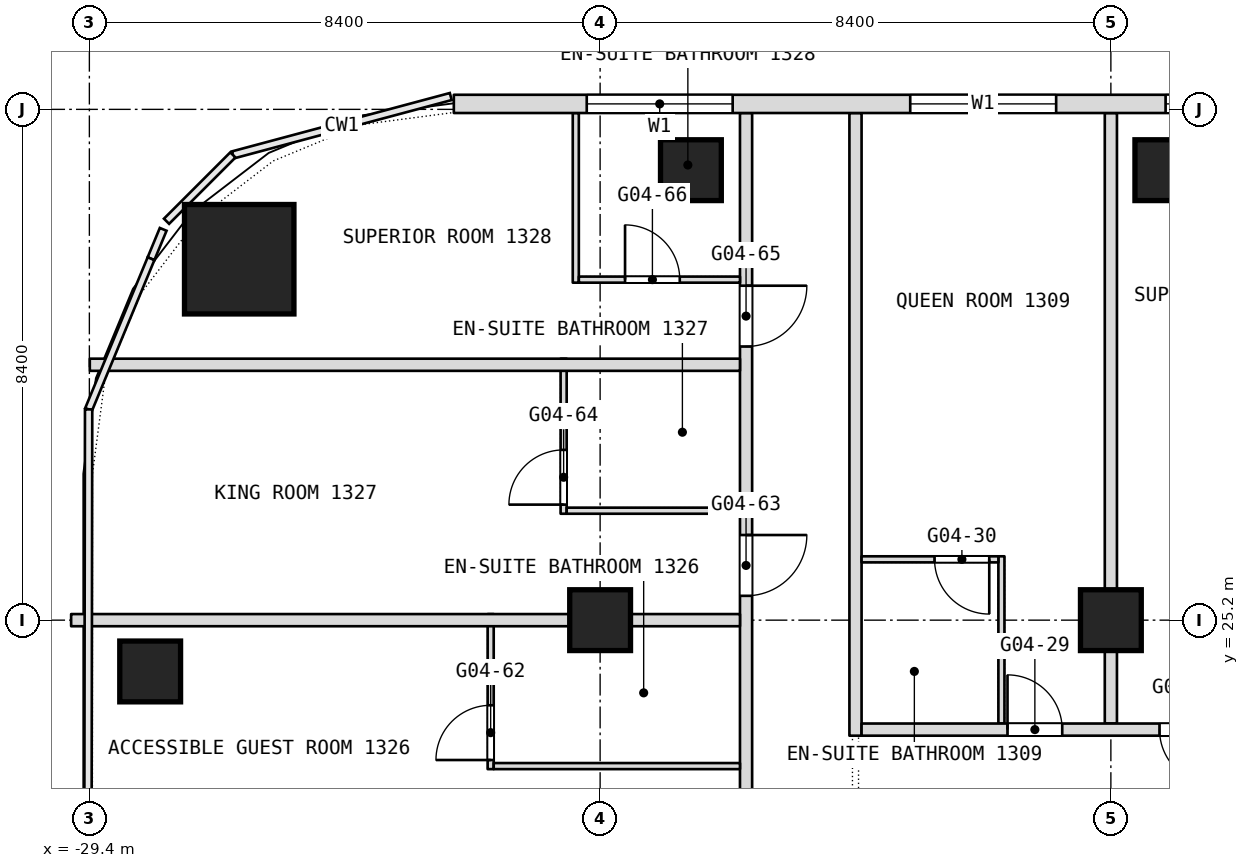
"""IFC4 building model, lengths in metres.
Left out: names, types, materials, properties, quantities, classifications, styles, units other than length and angle.
Written with IfcOpenShell. Run it as: python <this file> out.ifc"""

import sys

from ifc_helpers import new_model, si_unit, direction, frame, frame_2d, origin, origin_2d, place, context, subcontext, project, spatial, rectangle, extrude, element, fill, save


model = new_model("IFC4")
c1 = context("Model", 3, precision=1e-05, world=origin(), true_north=direction((0.0, 1.0)))
c2 = subcontext(c1, "Body", "Model", "MODEL_VIEW")
j1 = project(units=[si_unit("LENGTHUNIT", "METRE"), si_unit("PLANEANGLEUNIT", "RADIAN")], contexts=[c1])
p1 = place(None, origin())
s1 = spatial("IfcSite", under=j1, at=p1, CompositionType="ELEMENT")
p2 = place(p1, origin())
s2 = spatial("IfcBuilding", under=s1, at=p2, CompositionType="ELEMENT")
p3 = place(p2, frame((0.0, 0.0, 61.7)))
s3 = spatial("IfcBuildingStorey", under=s2, at=p3, CompositionType="ELEMENT", Elevation=61.7)
p4 = place(p3, frame((-26.936, 31.135, 0.0), z_axis=(0.0, 0.0, 1.0), x_axis=(1.0, 0.0, 0.0)))
e1 = element("IfcColumn", 1, at=p4, inside=s3, PredefinedType="COLUMN", context=c2, shape_type="SweptSolid", body=[
    extrude(rectangle(XDim=1.8, YDim=1.8, at=origin_2d()), origin(), (0.0, 0.0, 1.0), 3.6),
])
for number, where, z_axis, x_axis in (
    (2, (-21.0, 25.2, 0.0), (0.0, 0.0, 1.0), (1.0, 0.0, 0.0)),
    (3, (-12.6, 25.2, 0.0), (0.0, 0.0, 1.0), (1.0, 0.0, 0.0)),
    (4, (-28.4, 24.356, 0.0), (0.0, 0.0, 1.0), (1.0, 0.0, 0.0)),
    (5, (-19.507, 32.6, 0.0), (0.0, 0.0, 1.0), (1.0, 0.0, 0.0)),
    (6, (-11.704, 32.6, 0.0), (0.0, 0.0, 1.0), (1.0, 0.0, 0.0)),
):
    element("IfcColumn", number, at=place(p3, frame(where, z_axis=z_axis, x_axis=x_axis)), inside=s3, PredefinedType="COLUMN", context=c2, shape_type="SweptSolid", body=[
        extrude(rectangle(XDim=1.0, YDim=1.0, at=origin_2d()), origin(), (0.0, 0.0, 1.0), 3.6),
    ])
p5 = place(p3, frame((-12.6, 23.5, 0.0), z_axis=(0.0, 0.0, 1.0), x_axis=(0.0, 1.0, 0.0)))
e7 = element("IfcWall", 7, at=p5, inside=s3, PredefinedType="PARTITIONING", context=c2, shape_type="SweptSolid", body=[
    extrude(rectangle(XDim=10.04, YDim=0.2, at=frame_2d((5.02, 0.0))), origin(), (0.0, 0.0, 1.0), 3.34),
])
p6 = place(p3, frame((-14.4, 23.5, 0.0), z_axis=(0.0, 0.0, 1.0), x_axis=(0.0, 1.0, 0.0)))
e8 = element("IfcWall", 8, at=p6, inside=s3, PredefinedType="PARTITIONING", context=c2, shape_type="SweptSolid", body=[
    extrude(rectangle(XDim=2.75, YDim=0.1, at=frame_2d((1.375, 0.0))), origin(), (0.0, 0.0, 1.0), 3.34),
])
p7 = place(p3, frame((-16.8, 23.3, 0.0), z_axis=(0.0, 0.0, 1.0), x_axis=(0.0, 1.0, 0.0)))
e9 = element("IfcWall", 9, at=p7, inside=s3, PredefinedType="PARTITIONING", context=c2, shape_type="SweptSolid", body=[
    extrude(rectangle(XDim=10.24, YDim=0.2, at=frame_2d((5.12, 0.0))), origin(), (0.0, 0.0, 1.0), 3.34),
])
p8 = place(p3, frame((-18.6, 18.5, 0.0), z_axis=(0.0, 0.0, 1.0), x_axis=(0.0, 1.0, 0.0)))
e10 = element("IfcWall", 10, at=p8, inside=s3, PredefinedType="PARTITIONING", context=c2, shape_type="SweptSolid", body=[
    extrude(rectangle(XDim=15.04, YDim=0.2, at=frame_2d((7.52, 0.0))), origin(), (0.0, 0.0, 1.0), 3.34),
])
p9 = place(p8, frame((2.9, 0.0, 0.0)))
e11 = element("IfcOpeningElement", 11, at=p9, cuts=e10, PredefinedType="OPENING", context=c2, shape_type="SweptSolid", body=[
    extrude(rectangle(XDim=1.0, YDim=2.1, at=frame_2d((0.5, 1.05))), frame((0.0, 0.1, 0.0), z_axis=(0.0, -1.0, 0.0), x_axis=(1.0, 0.0, 0.0)), (0.0, 0.0, 1.0), 0.2),
])
p10 = place(p8, frame((7.1, 0.0, 0.0)))
e12 = element("IfcOpeningElement", 12, at=p10, cuts=e10, PredefinedType="OPENING", context=c2, shape_type="SweptSolid", body=[
    extrude(rectangle(XDim=1.0, YDim=2.1, at=frame_2d((0.5, 1.05))), frame((0.0, 0.1, 0.0), z_axis=(0.0, -1.0, 0.0), x_axis=(1.0, 0.0, 0.0)), (0.0, 0.0, 1.0), 0.2),
])
p11 = place(p8, frame((11.2, 0.0, 0.0)))
e13 = element("IfcOpeningElement", 13, at=p11, cuts=e10, PredefinedType="OPENING", context=c2, shape_type="SweptSolid", body=[
    extrude(rectangle(XDim=1.0, YDim=2.1, at=frame_2d((0.5, 1.05))), frame((0.0, 0.1, 0.0), z_axis=(0.0, -1.0, 0.0), x_axis=(1.0, 0.0, 0.0)), (0.0, 0.0, 1.0), 0.2),
])
p12 = place(p3, frame((-21.4, 30.75, 0.0), z_axis=(0.0, 0.0, 1.0), x_axis=(0.0, 1.0, 0.0)))
e14 = element("IfcWall", 14, at=p12, inside=s3, PredefinedType="PARTITIONING", context=c2, shape_type="SweptSolid", body=[
    extrude(rectangle(XDim=2.79, YDim=0.1, at=frame_2d((1.395, 0.0))), origin(), (0.0, 0.0, 1.0), 3.34),
])
p13 = place(p3, frame((-21.6, 26.95, 0.0), z_axis=(0.0, 0.0, 1.0), x_axis=(0.0, 1.0, 0.0)))
e15 = element("IfcWall", 15, at=p13, inside=s3, PredefinedType="PARTITIONING", context=c2, shape_type="SweptSolid", body=[
    extrude(rectangle(XDim=2.55, YDim=0.1, at=frame_2d((1.275, 0.0))), origin(), (0.0, 0.0, 1.0), 3.34),
])
p14 = place(p13, frame((0.15, 0.0, 0.0)))
e16 = element("IfcOpeningElement", 16, at=p14, cuts=e15, PredefinedType="OPENING", context=c2, shape_type="SweptSolid", body=[
    extrude(rectangle(XDim=0.9, YDim=2.1, at=frame_2d((0.45, 1.05))), frame((0.0, 0.05, 0.0), z_axis=(0.0, -1.0, 0.0), x_axis=(1.0, 0.0, 0.0)), (0.0, 0.0, 1.0), 0.1),
])
p15 = place(p3, frame((-22.8, 22.75, 0.0), z_axis=(0.0, 0.0, 1.0), x_axis=(0.0, 1.0, 0.0)))
e17 = element("IfcWall", 17, at=p15, inside=s3, PredefinedType="PARTITIONING", context=c2, shape_type="SweptSolid", body=[
    extrude(rectangle(XDim=2.55, YDim=0.1, at=frame_2d((1.275, 0.0))), origin(), (0.0, 0.0, 1.0), 3.34),
])
p16 = place(p15, frame((0.15, 0.0, 0.0)))
e18 = element("IfcOpeningElement", 18, at=p16, cuts=e17, PredefinedType="OPENING", context=c2, shape_type="SweptSolid", body=[
    extrude(rectangle(XDim=0.9, YDim=2.1, at=frame_2d((0.45, 1.05))), frame((0.0, 0.05, 0.0), z_axis=(0.0, -1.0, 0.0), x_axis=(1.0, 0.0, 0.0)), (0.0, 0.0, 1.0), 0.1),
])
p17 = place(p3, frame((-22.75, 22.8, 0.0), z_axis=(0.0, 0.0, 1.0), x_axis=(1.0, 0.0, 0.0)))
e19 = element("IfcWall", 19, at=p17, inside=s3, PredefinedType="PARTITIONING", context=c2, shape_type="SweptSolid", body=[
    extrude(rectangle(XDim=4.05, YDim=0.1, at=frame_2d((2.025, 0.0))), origin(), (0.0, 0.0, 1.0), 3.34),
])
p18 = place(p3, frame((-16.7, 23.4, 0.0), z_axis=(0.0, 0.0, 1.0), x_axis=(1.0, 0.0, 0.0)))
e20 = element("IfcWall", 20, at=p18, inside=s3, PredefinedType="PARTITIONING", context=c2, shape_type="SweptSolid", body=[
    extrude(rectangle(XDim=23.4, YDim=0.2, at=frame_2d((11.7, 0.0))), origin(), (0.0, 0.0, 1.0), 3.34),
])
p19 = place(p18, frame((2.4, 0.0, 0.0)))
e21 = element("IfcOpeningElement", 21, at=p19, cuts=e20, PredefinedType="OPENING", context=c2, shape_type="SweptSolid", body=[
    extrude(rectangle(XDim=0.9, YDim=2.1, at=frame_2d((0.45, 1.05))), frame((0.0, 0.1, 0.0), z_axis=(0.0, -1.0, 0.0), x_axis=(1.0, 0.0, 0.0)), (0.0, 0.0, 1.0), 0.2),
])
p20 = place(p18, frame((4.9, 0.0, 0.0)))
e22 = element("IfcOpeningElement", 22, at=p20, cuts=e20, PredefinedType="OPENING", context=c2, shape_type="SweptSolid", body=[
    extrude(rectangle(XDim=0.9, YDim=2.1, at=frame_2d((0.45, 1.05))), frame((0.0, 0.1, 0.0), z_axis=(0.0, -1.0, 0.0), x_axis=(1.0, 0.0, 0.0)), (0.0, 0.0, 1.0), 0.2),
])
p21 = place(p18, frame((10.8, 0.0, 0.0)))
e23 = element("IfcOpeningElement", 23, at=p21, cuts=e20, PredefinedType="OPENING", context=c2, shape_type="SweptSolid", body=[
    extrude(rectangle(XDim=0.9, YDim=2.1, at=frame_2d((0.45, 1.05))), frame((0.0, 0.1, 0.0), z_axis=(0.0, -1.0, 0.0), x_axis=(1.0, 0.0, 0.0)), (0.0, 0.0, 1.0), 0.2),
])
p22 = place(p18, frame((16.2, 0.0, 0.0)))
e24 = element("IfcOpeningElement", 24, at=p22, cuts=e20, PredefinedType="OPENING", context=c2, shape_type="SweptSolid", body=[
    extrude(rectangle(XDim=1.1, YDim=2.1, at=frame_2d((0.55, 1.05))), frame((0.0, 0.1, 0.0), z_axis=(0.0, -1.0, 0.0), x_axis=(1.0, 0.0, 0.0)), (0.0, 0.0, 1.0), 0.2),
])
p23 = place(p18, frame((21.7, 0.0, 0.0)))
e25 = element("IfcOpeningElement", 25, at=p23, cuts=e20, PredefinedType="OPENING", context=c2, shape_type="SweptSolid", body=[
    extrude(rectangle(XDim=0.9, YDim=2.1, at=frame_2d((0.45, 1.05))), frame((0.0, 0.1, 0.0), z_axis=(0.0, -1.0, 0.0), x_axis=(1.0, 0.0, 0.0)), (0.0, 0.0, 1.0), 0.2),
])
p24 = place(p3, frame((-29.7, 25.2, 0.0), z_axis=(0.0, 0.0, 1.0), x_axis=(1.0, 0.0, 0.0)))
e26 = element("IfcWall", 26, at=p24, inside=s3, PredefinedType="PARTITIONING", context=c2, shape_type="SweptSolid", body=[
    extrude(rectangle(XDim=11.0, YDim=0.2, at=frame_2d((5.5, 0.0))), origin(), (0.0, 0.0, 1.0), 2.84),
])
p25 = place(p3, frame((-16.7, 26.2, 0.0), z_axis=(0.0, 0.0, 1.0), x_axis=(1.0, 0.0, 0.0)))
e27 = element("IfcWall", 27, at=p25, inside=s3, PredefinedType="PARTITIONING", context=c2, shape_type="SweptSolid", body=[
    extrude(rectangle(XDim=2.25, YDim=0.1, at=frame_2d((1.125, 0.0))), origin(), (0.0, 0.0, 1.0), 3.34),
])
p26 = place(p25, frame((1.2, 0.0, 0.0)))
e28 = element("IfcOpeningElement", 28, at=p26, cuts=e27, PredefinedType="OPENING", context=c2, shape_type="SweptSolid", body=[
    extrude(rectangle(XDim=0.9, YDim=2.1, at=frame_2d((0.45, 1.05))), frame((0.0, 0.05, 0.0), z_axis=(0.0, -1.0, 0.0), x_axis=(1.0, 0.0, 0.0)), (0.0, 0.0, 1.0), 0.1),
])
p27 = place(p3, frame((-21.55, 27.0, 0.0), z_axis=(0.0, 0.0, 1.0), x_axis=(1.0, 0.0, 0.0)))
e29 = element("IfcWall", 29, at=p27, inside=s3, PredefinedType="PARTITIONING", context=c2, shape_type="SweptSolid", body=[
    extrude(rectangle(XDim=2.85, YDim=0.1, at=frame_2d((1.425, 0.0))), origin(), (0.0, 0.0, 1.0), 3.34),
])
p28 = place(p3, frame((-29.393, 29.4, 0.0), z_axis=(0.0, 0.0, 1.0), x_axis=(1.0, 0.0, 0.0)))
e30 = element("IfcWall", 30, at=p28, inside=s3, PredefinedType="PARTITIONING", context=c2, shape_type="SweptSolid", body=[
    extrude(rectangle(XDim=10.693, YDim=0.2, at=frame_2d((5.347, 0.0))), origin(), (0.0, 0.0, 1.0), 3.34),
])
p29 = place(p3, frame((-21.35, 30.8, 0.0), z_axis=(0.0, 0.0, 1.0), x_axis=(1.0, 0.0, 0.0)))
e31 = element("IfcWall", 31, at=p29, inside=s3, PredefinedType="PARTITIONING", context=c2, shape_type="SweptSolid", body=[
    extrude(rectangle(XDim=2.65, YDim=0.1, at=frame_2d((1.325, 0.0))), origin(), (0.0, 0.0, 1.0), 3.34),
])
p30 = place(p29, frame((0.76, 0.0, 0.0)))
e32 = element("IfcOpeningElement", 32, at=p30, cuts=e31, PredefinedType="OPENING", context=c2, shape_type="SweptSolid", body=[
    extrude(rectangle(XDim=0.9, YDim=2.1, at=frame_2d((0.45, 1.05))), frame((0.0, 0.05, 0.0), z_axis=(0.0, -1.0, 0.0), x_axis=(1.0, 0.0, 0.0)), (0.0, 0.0, 1.0), 0.1),
])
p31 = place(p3, frame((23.406, 33.69, 0.0), z_axis=(0.0, 0.0, 1.0), x_axis=(-1.0, 0.0, 0.0)))
e33 = element("IfcWall", 33, at=p31, inside=s3, PredefinedType="NOTDEFINED", context=c2, shape_type="SweptSolid", body=[
    extrude(rectangle(XDim=46.812, YDim=0.3, at=frame_2d((23.406, 0.0))), origin(), (0.0, 0.0, 1.0), 3.6),
])
p32 = place(p31, frame((2.186, 0.0, 0.9)))
e34 = element("IfcOpeningElement", 34, at=p32, cuts=e33, PredefinedType="OPENING", context=c2, shape_type="SweptSolid", body=[
    extrude(rectangle(XDim=2.4, YDim=2.1, at=frame_2d((1.2, 1.05))), frame((0.0, 0.15, 0.0), z_axis=(0.0, -1.0, 0.0), x_axis=(1.0, 0.0, 0.0)), (0.0, 0.0, 1.0), 0.3),
])
p33 = place(p31, frame((7.506, 0.0, 0.9)))
e35 = element("IfcOpeningElement", 35, at=p33, cuts=e33, PredefinedType="OPENING", context=c2, shape_type="SweptSolid", body=[
    extrude(rectangle(XDim=2.4, YDim=2.1, at=frame_2d((1.2, 1.05))), frame((0.0, 0.15, 0.0), z_axis=(0.0, -1.0, 0.0), x_axis=(1.0, 0.0, 0.0)), (0.0, 0.0, 1.0), 0.3),
])
p34 = place(p31, frame((11.706, 0.0, 0.9)))
e36 = element("IfcOpeningElement", 36, at=p34, cuts=e33, PredefinedType="OPENING", context=c2, shape_type="SweptSolid", body=[
    extrude(rectangle(XDim=2.4, YDim=2.1, at=frame_2d((1.2, 1.05))), frame((0.0, 0.15, 0.0), z_axis=(0.0, -1.0, 0.0), x_axis=(1.0, 0.0, 0.0)), (0.0, 0.0, 1.0), 0.3),
])
p35 = place(p31, frame((15.906, 0.0, 0.9)))
e37 = element("IfcOpeningElement", 37, at=p35, cuts=e33, PredefinedType="OPENING", context=c2, shape_type="SweptSolid", body=[
    extrude(rectangle(XDim=2.4, YDim=2.1, at=frame_2d((1.2, 1.05))), frame((0.0, 0.15, 0.0), z_axis=(0.0, -1.0, 0.0), x_axis=(1.0, 0.0, 0.0)), (0.0, 0.0, 1.0), 0.3),
])
p36 = place(p31, frame((20.106, 0.0, 0.9)))
e38 = element("IfcOpeningElement", 38, at=p36, cuts=e33, PredefinedType="OPENING", context=c2, shape_type="SweptSolid", body=[
    extrude(rectangle(XDim=2.4, YDim=2.1, at=frame_2d((1.2, 1.05))), frame((0.0, 0.15, 0.0), z_axis=(0.0, -1.0, 0.0), x_axis=(1.0, 0.0, 0.0)), (0.0, 0.0, 1.0), 0.3),
])
p37 = place(p31, frame((24.306, 0.0, 0.9)))
e39 = element("IfcOpeningElement", 39, at=p37, cuts=e33, PredefinedType="OPENING", context=c2, shape_type="SweptSolid", body=[
    extrude(rectangle(XDim=2.4, YDim=2.1, at=frame_2d((1.2, 1.05))), frame((0.0, 0.15, 0.0), z_axis=(0.0, -1.0, 0.0), x_axis=(1.0, 0.0, 0.0)), (0.0, 0.0, 1.0), 0.3),
])
p38 = place(p31, frame((28.506, 0.0, 0.9)))
e40 = element("IfcOpeningElement", 40, at=p38, cuts=e33, PredefinedType="OPENING", context=c2, shape_type="SweptSolid", body=[
    extrude(rectangle(XDim=2.4, YDim=2.1, at=frame_2d((1.2, 1.05))), frame((0.0, 0.15, 0.0), z_axis=(0.0, -1.0, 0.0), x_axis=(1.0, 0.0, 0.0)), (0.0, 0.0, 1.0), 0.3),
])
p39 = place(p31, frame((32.706, 0.0, 0.9)))
e41 = element("IfcOpeningElement", 41, at=p39, cuts=e33, PredefinedType="OPENING", context=c2, shape_type="SweptSolid", body=[
    extrude(rectangle(XDim=2.4, YDim=2.1, at=frame_2d((1.2, 1.05))), frame((0.0, 0.15, 0.0), z_axis=(0.0, -1.0, 0.0), x_axis=(1.0, 0.0, 0.0)), (0.0, 0.0, 1.0), 0.3),
])
p40 = place(p31, frame((36.906, 0.0, 0.9)))
e42 = element("IfcOpeningElement", 42, at=p40, cuts=e33, PredefinedType="OPENING", context=c2, shape_type="SweptSolid", body=[
    extrude(rectangle(XDim=2.4, YDim=2.1, at=frame_2d((1.2, 1.05))), frame((0.0, 0.15, 0.0), z_axis=(0.0, -1.0, 0.0), x_axis=(1.0, 0.0, 0.0)), (0.0, 0.0, 1.0), 0.3),
])
p41 = place(p31, frame((42.226, 0.0, 0.9)))
e43 = element("IfcOpeningElement", 43, at=p41, cuts=e33, PredefinedType="OPENING", context=c2, shape_type="SweptSolid", body=[
    extrude(rectangle(XDim=2.4, YDim=2.1, at=frame_2d((1.2, 1.05))), frame((0.0, 0.15, 0.0), z_axis=(0.0, -1.0, 0.0), x_axis=(1.0, 0.0, 0.0)), (0.0, 0.0, 1.0), 0.3),
])
p42 = place(p10, origin())
e44 = element("IfcDoor", 44, at=p42, inside=s3, OperationType="SINGLE_SWING_RIGHT", PredefinedType="DOOR", context=c2, shape_type="SweptSolid", body=[
    extrude(rectangle(XDim=1.0, YDim=2.1, at=frame_2d((0.5, 1.05))), frame((0.0, 0.025, 0.0), z_axis=(0.0, -1.0, 0.0), x_axis=(1.0, 0.0, 0.0)), (0.0, 0.0, 1.0), 0.05),
])
fill(e12, e44)
p43 = place(p11, origin())
e45 = element("IfcDoor", 45, at=p43, inside=s3, OperationType="SINGLE_SWING_RIGHT", PredefinedType="DOOR", context=c2, shape_type="SweptSolid", body=[
    extrude(rectangle(XDim=1.0, YDim=2.1, at=frame_2d((0.5, 1.05))), frame((0.0, 0.025, 0.0), z_axis=(0.0, -1.0, 0.0), x_axis=(1.0, 0.0, 0.0)), (0.0, 0.0, 1.0), 0.05),
])
fill(e13, e45)
p44 = place(p14, origin())
e46 = element("IfcDoor", 46, at=p44, inside=s3, OperationType="SINGLE_SWING_RIGHT", PredefinedType="DOOR", context=c2, shape_type="SweptSolid", body=[
    extrude(rectangle(XDim=0.9, YDim=2.1, at=frame_2d((0.45, 1.05))), frame((0.0, 0.025, 0.0), z_axis=(0.0, -1.0, 0.0), x_axis=(1.0, 0.0, 0.0)), (0.0, 0.0, 1.0), 0.05),
])
fill(e16, e46)
p45 = place(p16, origin())
e47 = element("IfcDoor", 47, at=p45, inside=s3, OperationType="SINGLE_SWING_RIGHT", PredefinedType="DOOR", context=c2, shape_type="SweptSolid", body=[
    extrude(rectangle(XDim=0.9, YDim=2.1, at=frame_2d((0.45, 1.05))), frame((0.0, 0.025, 0.0), z_axis=(0.0, -1.0, 0.0), x_axis=(1.0, 0.0, 0.0)), (0.0, 0.0, 1.0), 0.05),
])
fill(e18, e47)
p46 = place(p19, origin())
e48 = element("IfcDoor", 48, at=p46, inside=s3, OperationType="SINGLE_SWING_LEFT", PredefinedType="DOOR", context=c2, shape_type="SweptSolid", body=[
    extrude(rectangle(XDim=0.9, YDim=2.1, at=frame_2d((0.45, 1.05))), frame((0.0, 0.025, 0.0), z_axis=(0.0, -1.0, 0.0), x_axis=(1.0, 0.0, 0.0)), (0.0, 0.0, 1.0), 0.05),
])
fill(e21, e48)
p47 = place(p20, origin())
e49 = element("IfcDoor", 49, at=p47, inside=s3, OperationType="SINGLE_SWING_RIGHT", PredefinedType="DOOR", context=c2, shape_type="SweptSolid", body=[
    extrude(rectangle(XDim=0.9, YDim=2.1, at=frame_2d((0.45, 1.05))), frame((0.0, 0.025, 0.0), z_axis=(0.0, -1.0, 0.0), x_axis=(1.0, 0.0, 0.0)), (0.0, 0.0, 1.0), 0.05),
])
fill(e22, e49)
p48 = place(p26, origin())
e50 = element("IfcDoor", 50, at=p48, inside=s3, OperationType="SINGLE_SWING_LEFT", PredefinedType="DOOR", context=c2, shape_type="SweptSolid", body=[
    extrude(rectangle(XDim=0.9, YDim=2.1, at=frame_2d((0.45, 1.05))), frame((0.0, 0.025, 0.0), z_axis=(0.0, -1.0, 0.0), x_axis=(1.0, 0.0, 0.0)), (0.0, 0.0, 1.0), 0.05),
])
fill(e28, e50)
p49 = place(p30, origin())
e51 = element("IfcDoor", 51, at=p49, inside=s3, OperationType="SINGLE_SWING_LEFT", PredefinedType="DOOR", context=c2, shape_type="SweptSolid", body=[
    extrude(rectangle(XDim=0.9, YDim=2.1, at=frame_2d((0.45, 1.05))), frame((0.0, 0.025, 0.0), z_axis=(0.0, -1.0, 0.0), x_axis=(1.0, 0.0, 0.0)), (0.0, 0.0, 1.0), 0.05),
])
fill(e32, e51)
p50 = place(p39, origin())
e52 = element("IfcWindow", 52, at=p50, inside=s3, PartitioningType="SINGLE_PANEL", PredefinedType="WINDOW", context=c2, shape_type="SweptSolid", body=[
    extrude(rectangle(XDim=2.4, YDim=2.1, at=frame_2d((1.2, 1.05))), frame((0.0, 0.03, 0.0), z_axis=(0.0, -1.0, 0.0), x_axis=(1.0, 0.0, 0.0)), (0.0, 0.0, 1.0), 0.06),
])
fill(e41, e52)
p51 = place(p40, origin())
e53 = element("IfcWindow", 53, at=p51, inside=s3, PartitioningType="SINGLE_PANEL", PredefinedType="WINDOW", context=c2, shape_type="SweptSolid", body=[
    extrude(rectangle(XDim=2.4, YDim=2.1, at=frame_2d((1.2, 1.05))), frame((0.0, 0.03, 0.0), z_axis=(0.0, -1.0, 0.0), x_axis=(1.0, 0.0, 0.0)), (0.0, 0.0, 1.0), 0.06),
])
fill(e42, e53)
p52 = place(p41, origin())
e54 = element("IfcWindow", 54, at=p52, inside=s3, PartitioningType="SINGLE_PANEL", PredefinedType="WINDOW", context=c2, shape_type="SweptSolid", body=[
    extrude(rectangle(XDim=2.4, YDim=2.1, at=frame_2d((1.2, 1.05))), frame((0.0, 0.03, 0.0), z_axis=(0.0, -1.0, 0.0), x_axis=(1.0, 0.0, 0.0)), (0.0, 0.0, 1.0), 0.06),
])
fill(e43, e54)
save(model, sys.argv[1])
